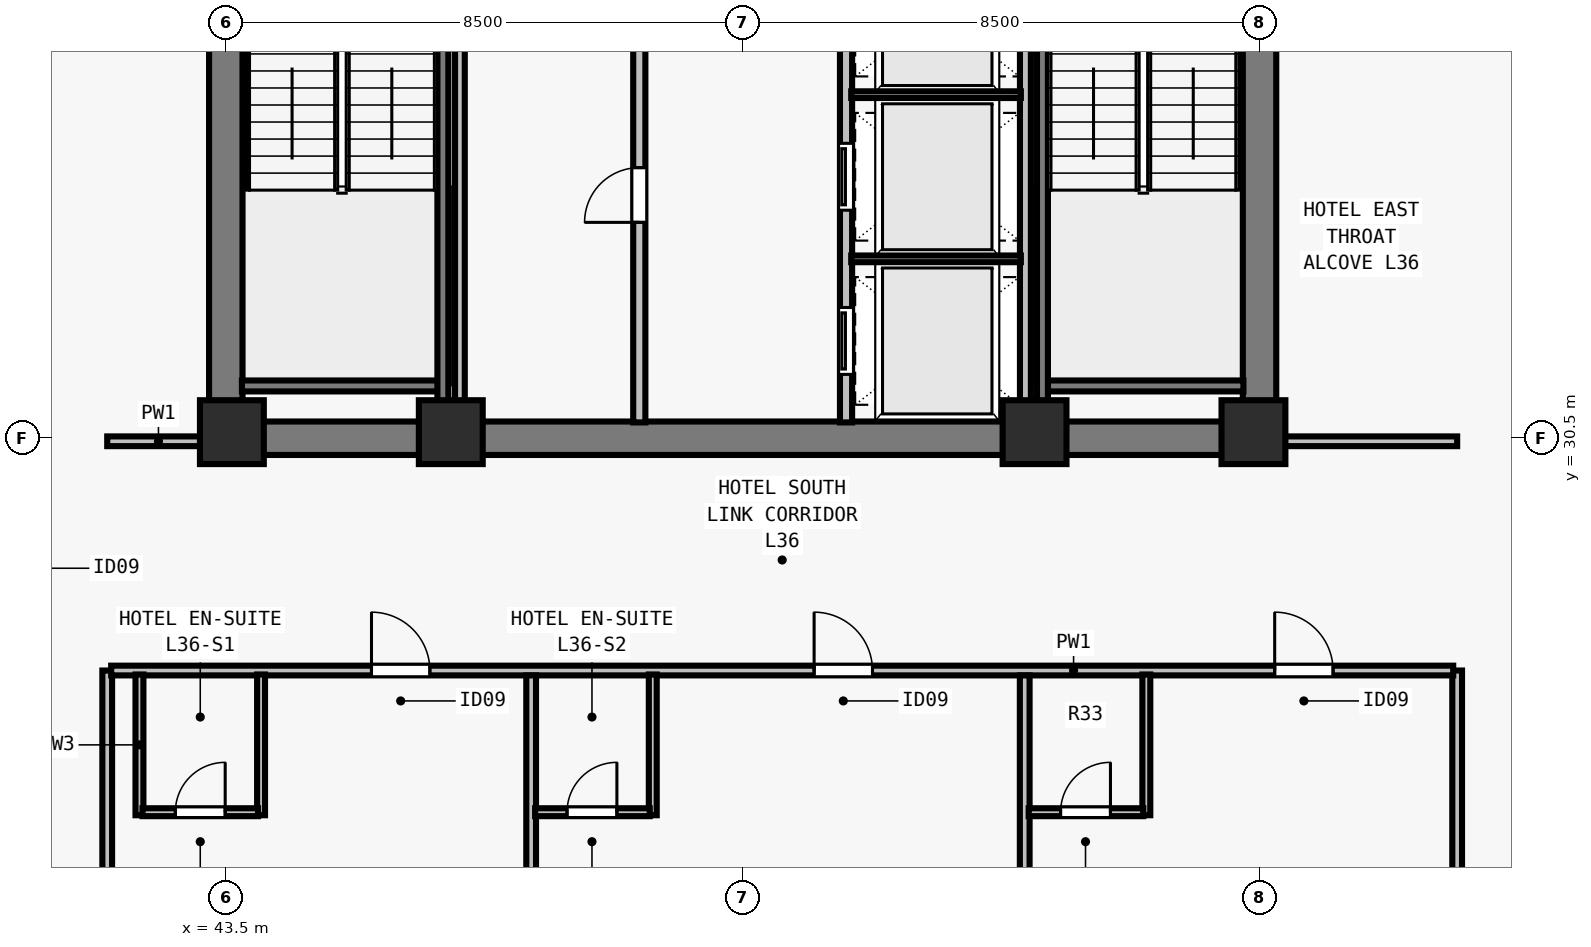
"""IFC4 building model, lengths in metres.
Left out: names, types, materials, properties, quantities, classifications, styles, units other than length and angle.
Written with IfcOpenShell. Run it as: python <this file> out.ifc"""

import sys

from ifc_helpers import new_model, si_unit, direction, frame, frame_2d, origin, origin_2d, place, context, subcontext, project, spatial, rectangle, extrude, element, fill, save


model = new_model("IFC4")
c1 = context("Model", 3, precision=1e-05, world=origin(), true_north=direction((0.0, 1.0)))
c2 = subcontext(c1, "Body", "Model", "MODEL_VIEW")
j1 = project(units=[si_unit("LENGTHUNIT", "METRE"), si_unit("PLANEANGLEUNIT", "RADIAN")], contexts=[c1])
p1 = place(None, origin())
s1 = spatial("IfcSite", under=j1, at=p1, CompositionType="ELEMENT")
p2 = place(p1, origin())
s2 = spatial("IfcBuilding", under=s1, at=p2, CompositionType="ELEMENT")
p3 = place(p2, frame((0.0, 0.0, 134.0)))
s3 = spatial("IfcBuildingStorey", under=s2, at=p3, CompositionType="ELEMENT", Elevation=134.0)
for number, where, z_axis, x_axis in (
    (1, (43.6, 30.6, 0.0), (0.0, 0.0, 1.0), (1.0, 0.0, 0.0)),
    (2, (47.2, 30.6, 0.0), (0.0, 0.0, 1.0), (1.0, 0.0, 0.0)),
    (3, (56.8, 30.6, 0.0), (0.0, 0.0, 1.0), (1.0, 0.0, 0.0)),
    (4, (60.4, 30.6, 0.0), (0.0, 0.0, 1.0), (1.0, 0.0, 0.0)),
):
    element("IfcColumn", number, at=place(p3, frame(where, z_axis=z_axis, x_axis=x_axis)), inside=s3, PredefinedType="COLUMN", context=c2, shape_type="SweptSolid", body=[
        extrude(rectangle(XDim=1.05, YDim=1.05, at=origin_2d()), origin(), (0.0, 0.0, 1.0), 3.5),
    ])
p4 = place(p3, frame((43.225, 30.5, 0.0), z_axis=(0.0, 0.0, 1.0), x_axis=(1.0, 0.0, 0.0)))
e5 = element("IfcWall", 5, at=p4, inside=s3, PredefinedType="SHEAR", context=c2, shape_type="SweptSolid", body=[
    extrude(rectangle(XDim=17.55, YDim=0.55, at=frame_2d((8.775, 0.0))), origin(), (0.0, 0.0, 1.0), 3.28),
])
for number, where, z_axis, x_axis in (
    (6, (43.5, 30.765, 0.0), (0.0, 0.0, 1.0), (0.0, 1.0, 0.0)),
    (7, (60.5, 30.765, 0.0), (0.0, 0.0, 1.0), (0.0, 1.0, 0.0)),
):
    element("IfcWall", number, at=place(p3, frame(where, z_axis=z_axis, x_axis=x_axis)), inside=s3, PredefinedType="SHEAR", context=c2, shape_type="SweptSolid", body=[
        extrude(rectangle(XDim=7.985, YDim=0.55, at=frame_2d((3.993, 0.0))), origin(), (0.0, 0.0, 1.0), 3.28),
    ])
p5 = place(p3, frame((50.3, 30.76, 0.0), z_axis=(0.0, 0.0, 1.0), x_axis=(0.0, 1.0, 0.0)))
e8 = element("IfcWall", 8, at=p5, inside=s3, PredefinedType="SOLIDWALL", context=c2, shape_type="SweptSolid", body=[
    extrude(rectangle(XDim=7.855, YDim=0.2, at=frame_2d((3.927, 0.0))), origin(), (0.0, 0.0, 1.0), 3.28),
])
p6 = place(p5, frame((3.29, 0.0, 0.0)))
e9 = element("IfcOpeningElement", 9, at=p6, cuts=e8, PredefinedType="OPENING", context=c2, shape_type="SweptSolid", body=[
    extrude(rectangle(XDim=0.9, YDim=2.12, at=frame_2d((0.45, 1.06))), frame((0.0, 0.11, 0.0), z_axis=(0.0, -1.0, 0.0), x_axis=(1.0, 0.0, 0.0)), (0.0, 0.0, 1.0), 0.22),
])
p7 = place(p3, frame((53.7, 30.76, 0.0), z_axis=(0.0, 0.0, 1.0), x_axis=(0.0, 1.0, 0.0)))
e10 = element("IfcWall", 10, at=p7, inside=s3, PredefinedType="SOLIDWALL", context=c2, shape_type="SweptSolid", body=[
    extrude(rectangle(XDim=7.855, YDim=0.2, at=frame_2d((3.927, 0.0))), origin(), (0.0, 0.0, 1.0), 3.28),
])
p8 = place(p7, frame((0.79, 0.0, 0.0)))
e11 = element("IfcOpeningElement", 11, at=p8, cuts=e10, PredefinedType="OPENING", context=c2, shape_type="SweptSolid", body=[
    extrude(rectangle(XDim=1.1, YDim=2.2, at=frame_2d((0.55, 1.1))), frame((0.0, 0.11, 0.0), z_axis=(0.0, -1.0, 0.0), x_axis=(1.0, 0.0, 0.0)), (0.0, 0.0, 1.0), 0.22),
])
p9 = place(p7, frame((3.49, 0.0, 0.0)))
e12 = element("IfcOpeningElement", 12, at=p9, cuts=e10, PredefinedType="OPENING", context=c2, shape_type="SweptSolid", body=[
    extrude(rectangle(XDim=1.1, YDim=2.2, at=frame_2d((0.55, 1.1))), frame((0.0, 0.11, 0.0), z_axis=(0.0, -1.0, 0.0), x_axis=(1.0, 0.0, 0.0)), (0.0, 0.0, 1.0), 0.22),
])
p10 = place(p7, frame((6.19, 0.0, 0.0)))
e13 = element("IfcOpeningElement", 13, at=p10, cuts=e10, PredefinedType="OPENING", context=c2, shape_type="SweptSolid", body=[
    extrude(rectangle(XDim=1.1, YDim=2.2, at=frame_2d((0.55, 1.1))), frame((0.0, 0.11, 0.0), z_axis=(0.0, -1.0, 0.0), x_axis=(1.0, 0.0, 0.0)), (0.0, 0.0, 1.0), 0.22),
])
p11 = place(p3, frame((47.35, 30.76, 0.0), z_axis=(0.0, 0.0, 1.0), x_axis=(0.0, 1.0, 0.0)))
e14 = element("IfcWall", 14, at=p11, inside=s3, PredefinedType="PARTITIONING", context=c2, shape_type="SweptSolid", body=[
    extrude(rectangle(XDim=7.855, YDim=0.16, at=frame_2d((3.927, 0.0))), origin(), (0.0, 0.0, 1.0), 3.28),
])
p12 = place(p3, frame((56.65, 30.76, 0.0), z_axis=(0.0, 0.0, 1.0), x_axis=(0.0, 1.0, 0.0)))
e15 = element("IfcWall", 15, at=p12, inside=s3, PredefinedType="SOLIDWALL", context=c2, shape_type="SweptSolid", body=[
    extrude(rectangle(XDim=7.855, YDim=0.18, at=frame_2d((3.927, 0.0))), origin(), (0.0, 0.0, 1.0), 3.28),
])
for number, where, z_axis, x_axis in (
    (16, (53.785, 33.45, 0.0), (0.0, 0.0, 1.0), (1.0, 0.0, 0.0)),
    (17, (53.785, 36.15, 0.0), (0.0, 0.0, 1.0), (1.0, 0.0, 0.0)),
):
    element("IfcWall", number, at=place(p3, frame(where, z_axis=z_axis, x_axis=x_axis)), inside=s3, PredefinedType="PARTITIONING", context=c2, shape_type="SweptSolid", body=[
        extrude(rectangle(XDim=2.79, YDim=0.11, at=frame_2d((1.395, 0.0))), origin(), (0.0, 0.0, 1.0), 3.28),
    ])
p13 = place(p3, frame((41.55, 15.325, 0.0), z_axis=(0.0, 0.0, 1.0), x_axis=(0.0, 1.0, 0.0)))
e18 = element("IfcWall", 18, at=p13, inside=s3, PredefinedType="PARTITIONING", context=c2, shape_type="SweptSolid", body=[
    extrude(rectangle(XDim=11.355, YDim=0.16, at=frame_2d((5.677, 0.0))), origin(), (0.0, 0.0, 1.0), 3.28),
])
p14 = place(p3, frame((41.55, 30.45, 0.0), z_axis=(0.0, 0.0, 1.0), x_axis=(1.0, 0.0, 0.0)))
e19 = element("IfcWall", 19, at=p14, inside=s3, PredefinedType="PARTITIONING", context=c2, shape_type="SweptSolid", body=[
    extrude(rectangle(XDim=1.685, YDim=0.16, at=frame_2d((0.843, 0.0))), origin(), (0.0, 0.0, 1.0), 3.28),
])
p15 = place(p3, frame((63.75, 15.325, 0.0), z_axis=(0.0, 0.0, 1.0), x_axis=(0.0, 1.0, 0.0)))
e20 = element("IfcWall", 20, at=p15, inside=s3, PredefinedType="PARTITIONING", context=c2, shape_type="SweptSolid", body=[
    extrude(rectangle(XDim=11.355, YDim=0.16, at=frame_2d((5.677, 0.0))), origin(), (0.0, 0.0, 1.0), 2.555),
])
p16 = place(p3, frame((60.765, 30.45, 0.0), z_axis=(0.0, 0.0, 1.0), x_axis=(1.0, 0.0, 0.0)))
e21 = element("IfcWall", 21, at=p16, inside=s3, PredefinedType="PARTITIONING", context=c2, shape_type="SweptSolid", body=[
    extrude(rectangle(XDim=2.985, YDim=0.16, at=frame_2d((1.493, 0.0))), origin(), (0.0, 0.0, 1.0), 3.28),
])
p17 = place(p3, frame((41.615, 26.68, 0.0), z_axis=(0.0, 0.0, 1.0), x_axis=(1.0, 0.0, 0.0)))
e22 = element("IfcWall", 22, at=p17, inside=s3, PredefinedType="PARTITIONING", context=c2, shape_type="SweptSolid", body=[
    extrude(rectangle(XDim=22.07, YDim=0.16, at=frame_2d((11.035, 0.0))), origin(), (0.0, 0.0, 1.0), 3.28),
])
p18 = place(p17, frame((4.281, 0.0, 0.0)))
e23 = element("IfcOpeningElement", 23, at=p18, cuts=e22, PredefinedType="OPENING", context=c2, shape_type="SweptSolid", body=[
    extrude(rectangle(XDim=0.96, YDim=2.15, at=frame_2d((0.48, 1.075))), frame((0.0, 0.09, 0.0), z_axis=(0.0, -1.0, 0.0), x_axis=(1.0, 0.0, 0.0)), (0.0, 0.0, 1.0), 0.18),
])
p19 = place(p17, frame((11.56, 0.0, 0.0)))
e24 = element("IfcOpeningElement", 24, at=p19, cuts=e22, PredefinedType="OPENING", context=c2, shape_type="SweptSolid", body=[
    extrude(rectangle(XDim=0.96, YDim=2.15, at=frame_2d((0.48, 1.075))), frame((0.0, 0.09, 0.0), z_axis=(0.0, -1.0, 0.0), x_axis=(1.0, 0.0, 0.0)), (0.0, 0.0, 1.0), 0.18),
])
p20 = place(p17, frame((19.134, 0.0, 0.0)))
e25 = element("IfcOpeningElement", 25, at=p20, cuts=e22, PredefinedType="OPENING", context=c2, shape_type="SweptSolid", body=[
    extrude(rectangle(XDim=0.96, YDim=2.15, at=frame_2d((0.48, 1.075))), frame((0.0, 0.09, 0.0), z_axis=(0.0, -1.0, 0.0), x_axis=(1.0, 0.0, 0.0)), (0.0, 0.0, 1.0), 0.18),
])
for number, where, z_axis, x_axis in (
    (26, (42.08, 24.3, 0.0), (0.0, 0.0, 1.0), (0.0, 1.0, 0.0)),
    (27, (44.08, 24.3, 0.0), (0.0, 0.0, 1.0), (0.0, 1.0, 0.0)),
):
    element("IfcWall", number, at=place(p3, frame(where, z_axis=z_axis, x_axis=x_axis)), inside=s3, PredefinedType="PLUMBINGWALL", context=c2, shape_type="SweptSolid", body=[
        extrude(rectangle(XDim=2.315, YDim=0.13, at=frame_2d((1.157, 0.0))), origin(), (0.0, 0.0, 1.0), 3.28),
    ])
p21 = place(p3, frame((42.13, 24.35, 0.0), z_axis=(0.0, 0.0, 1.0), x_axis=(1.0, 0.0, 0.0)))
e28 = element("IfcWall", 28, at=p21, inside=s3, PredefinedType="PLUMBINGWALL", context=c2, shape_type="SweptSolid", body=[
    extrude(rectangle(XDim=1.9, YDim=0.13, at=frame_2d((0.95, 0.0))), origin(), (0.0, 0.0, 1.0), 3.28),
])
p22 = place(p21, frame((0.54, 0.0, 0.0)))
e29 = element("IfcOpeningElement", 29, at=p22, cuts=e28, PredefinedType="OPENING", context=c2, shape_type="SweptSolid", body=[
    extrude(rectangle(XDim=0.82, YDim=2.1, at=frame_2d((0.41, 1.05))), frame((0.0, 0.075, 0.0), z_axis=(0.0, -1.0, 0.0), x_axis=(1.0, 0.0, 0.0)), (0.0, 0.0, 1.0), 0.15),
])
p23 = place(p3, frame((48.522, 15.325, 0.0), z_axis=(0.0, 0.0, 1.0), x_axis=(0.0, 1.0, 0.0)))
e30 = element("IfcWall", 30, at=p23, inside=s3, PredefinedType="PARTITIONING", context=c2, shape_type="SweptSolid", body=[
    extrude(rectangle(XDim=11.275, YDim=0.16, at=frame_2d((5.638, 0.0))), origin(), (0.0, 0.0, 1.0), 2.896),
])
p24 = place(p3, frame((50.522, 24.3, 0.0), z_axis=(0.0, 0.0, 1.0), x_axis=(0.0, 1.0, 0.0)))
e31 = element("IfcWall", 31, at=p24, inside=s3, PredefinedType="PLUMBINGWALL", context=c2, shape_type="SweptSolid", body=[
    extrude(rectangle(XDim=2.315, YDim=0.13, at=frame_2d((1.157, 0.0))), origin(), (0.0, 0.0, 1.0), 3.28),
])
p25 = place(p3, frame((48.587, 24.35, 0.0), z_axis=(0.0, 0.0, 1.0), x_axis=(1.0, 0.0, 0.0)))
e32 = element("IfcWall", 32, at=p25, inside=s3, PredefinedType="PLUMBINGWALL", context=c2, shape_type="SweptSolid", body=[
    extrude(rectangle(XDim=1.885, YDim=0.13, at=frame_2d((0.942, 0.0))), origin(), (0.0, 0.0, 1.0), 3.28),
])
p26 = place(p25, frame((0.525, 0.0, 0.0)))
e33 = element("IfcOpeningElement", 33, at=p26, cuts=e32, PredefinedType="OPENING", context=c2, shape_type="SweptSolid", body=[
    extrude(rectangle(XDim=0.82, YDim=2.1, at=frame_2d((0.41, 1.05))), frame((0.0, 0.075, 0.0), z_axis=(0.0, -1.0, 0.0), x_axis=(1.0, 0.0, 0.0)), (0.0, 0.0, 1.0), 0.15),
])
p27 = place(p3, frame((56.638, 15.325, 0.0), z_axis=(0.0, 0.0, 1.0), x_axis=(0.0, 1.0, 0.0)))
e34 = element("IfcWall", 34, at=p27, inside=s3, PredefinedType="PARTITIONING", context=c2, shape_type="SweptSolid", body=[
    extrude(rectangle(XDim=11.275, YDim=0.16, at=frame_2d((5.638, 0.0))), origin(), (0.0, 0.0, 1.0), 2.555),
])
p28 = place(p3, frame((58.638, 24.3, 0.0), z_axis=(0.0, 0.0, 1.0), x_axis=(0.0, 1.0, 0.0)))
e35 = element("IfcWall", 35, at=p28, inside=s3, PredefinedType="PLUMBINGWALL", context=c2, shape_type="SweptSolid", body=[
    extrude(rectangle(XDim=2.315, YDim=0.13, at=frame_2d((1.157, 0.0))), origin(), (0.0, 0.0, 1.0), 3.28),
])
p29 = place(p3, frame((56.703, 24.35, 0.0), z_axis=(0.0, 0.0, 1.0), x_axis=(1.0, 0.0, 0.0)))
e36 = element("IfcWall", 36, at=p29, inside=s3, PredefinedType="PLUMBINGWALL", context=c2, shape_type="SweptSolid", body=[
    extrude(rectangle(XDim=1.885, YDim=0.13, at=frame_2d((0.942, 0.0))), origin(), (0.0, 0.0, 1.0), 3.28),
])
p30 = place(p29, frame((0.525, 0.0, 0.0)))
e37 = element("IfcOpeningElement", 37, at=p30, cuts=e36, PredefinedType="OPENING", context=c2, shape_type="SweptSolid", body=[
    extrude(rectangle(XDim=0.82, YDim=2.1, at=frame_2d((0.41, 1.05))), frame((0.0, 0.075, 0.0), z_axis=(0.0, -1.0, 0.0), x_axis=(1.0, 0.0, 0.0)), (0.0, 0.0, 1.0), 0.15),
])
p31 = place(p3, frame((43.765, 31.36, 0.0), z_axis=(0.0, 0.0, 1.0), x_axis=(1.0, 0.0, 0.0)))
e38 = element("IfcWall", 38, at=p31, inside=s3, PredefinedType="SOLIDWALL", context=c2, shape_type="SweptSolid", body=[
    extrude(rectangle(XDim=3.23, YDim=0.18, at=frame_2d((1.615, 0.0))), origin(), (0.0, 0.0, 1.0), 3.28),
])
p32 = place(p3, frame((47.07, 38.78, 0.0), z_axis=(0.0, 0.0, 1.0), x_axis=(0.0, -1.0, 0.0)))
e39 = element("IfcWall", 39, at=p32, inside=s3, PredefinedType="SOLIDWALL", context=c2, shape_type="SweptSolid", body=[
    extrude(rectangle(XDim=8.017, YDim=0.18, at=frame_2d((4.009, 0.0))), origin(), (0.0, 0.0, 1.0), 3.28),
])
p33 = place(p3, frame((57.005, 31.36, 0.0), z_axis=(0.0, 0.0, 1.0), x_axis=(1.0, 0.0, 0.0)))
e40 = element("IfcWall", 40, at=p33, inside=s3, PredefinedType="SOLIDWALL", context=c2, shape_type="SweptSolid", body=[
    extrude(rectangle(XDim=3.23, YDim=0.18, at=frame_2d((1.615, 0.0))), origin(), (0.0, 0.0, 1.0), 3.28),
])
p34 = place(p3, frame((56.93, 38.78, 0.0), z_axis=(0.0, 0.0, 1.0), x_axis=(0.0, -1.0, 0.0)))
e41 = element("IfcWall", 41, at=p34, inside=s3, PredefinedType="SOLIDWALL", context=c2, shape_type="SweptSolid", body=[
    extrude(rectangle(XDim=8.017, YDim=0.18, at=frame_2d((4.009, 0.0))), origin(), (0.0, 0.0, 1.0), 3.28),
])
p35 = place(p6, origin())
e42 = element("IfcDoor", 42, at=p35, inside=s3, OperationType="SINGLE_SWING_LEFT", PredefinedType="DOOR", context=c2, shape_type="SweptSolid", body=[
    extrude(rectangle(XDim=0.9, YDim=2.12, at=frame_2d((0.45, 1.06))), frame((0.0, 0.025, 0.0), z_axis=(0.0, -1.0, 0.0), x_axis=(1.0, 0.0, 0.0)), (0.0, 0.0, 1.0), 0.05),
])
fill(e9, e42)
p36 = place(p8, origin())
e43 = element("IfcDoor", 43, at=p36, inside=s3, OperationType="SLIDING_TO_LEFT", PredefinedType="DOOR", context=c2, shape_type="SweptSolid", body=[
    extrude(rectangle(XDim=1.1, YDim=2.2, at=frame_2d((0.55, 1.1))), frame((0.0, 0.025, 0.0), z_axis=(0.0, -1.0, 0.0), x_axis=(1.0, 0.0, 0.0)), (0.0, 0.0, 1.0), 0.05),
])
fill(e11, e43)
p37 = place(p9, origin())
e44 = element("IfcDoor", 44, at=p37, inside=s3, OperationType="SLIDING_TO_LEFT", PredefinedType="DOOR", context=c2, shape_type="SweptSolid", body=[
    extrude(rectangle(XDim=1.1, YDim=2.2, at=frame_2d((0.55, 1.1))), frame((0.0, 0.025, 0.0), z_axis=(0.0, -1.0, 0.0), x_axis=(1.0, 0.0, 0.0)), (0.0, 0.0, 1.0), 0.05),
])
fill(e12, e44)
p38 = place(p22, origin())
e45 = element("IfcDoor", 45, at=p38, inside=s3, OperationType="SINGLE_SWING_RIGHT", PredefinedType="DOOR", context=c2, shape_type="SweptSolid", body=[
    extrude(rectangle(XDim=0.82, YDim=2.1, at=frame_2d((0.41, 1.05))), frame((0.0, 0.025, 0.0), z_axis=(0.0, -1.0, 0.0), x_axis=(1.0, 0.0, 0.0)), (0.0, 0.0, 1.0), 0.05),
])
fill(e29, e45)
p39 = place(p18, origin())
e46 = element("IfcDoor", 46, at=p39, inside=s3, OperationType="SINGLE_SWING_LEFT", PredefinedType="DOOR", context=c2, shape_type="SweptSolid", body=[
    extrude(rectangle(XDim=0.96, YDim=2.15, at=frame_2d((0.48, 1.075))), frame((0.0, 0.025, 0.0), z_axis=(0.0, -1.0, 0.0), x_axis=(1.0, 0.0, 0.0)), (0.0, 0.0, 1.0), 0.05),
])
fill(e23, e46)
p40 = place(p26, origin())
e47 = element("IfcDoor", 47, at=p40, inside=s3, OperationType="SINGLE_SWING_RIGHT", PredefinedType="DOOR", context=c2, shape_type="SweptSolid", body=[
    extrude(rectangle(XDim=0.82, YDim=2.1, at=frame_2d((0.41, 1.05))), frame((0.0, 0.025, 0.0), z_axis=(0.0, -1.0, 0.0), x_axis=(1.0, 0.0, 0.0)), (0.0, 0.0, 1.0), 0.05),
])
fill(e33, e47)
p41 = place(p19, origin())
e48 = element("IfcDoor", 48, at=p41, inside=s3, OperationType="SINGLE_SWING_LEFT", PredefinedType="DOOR", context=c2, shape_type="SweptSolid", body=[
    extrude(rectangle(XDim=0.96, YDim=2.15, at=frame_2d((0.48, 1.075))), frame((0.0, 0.025, 0.0), z_axis=(0.0, -1.0, 0.0), x_axis=(1.0, 0.0, 0.0)), (0.0, 0.0, 1.0), 0.05),
])
fill(e24, e48)
p42 = place(p30, origin())
e49 = element("IfcDoor", 49, at=p42, inside=s3, OperationType="SINGLE_SWING_RIGHT", PredefinedType="DOOR", context=c2, shape_type="SweptSolid", body=[
    extrude(rectangle(XDim=0.82, YDim=2.1, at=frame_2d((0.41, 1.05))), frame((0.0, 0.025, 0.0), z_axis=(0.0, -1.0, 0.0), x_axis=(1.0, 0.0, 0.0)), (0.0, 0.0, 1.0), 0.05),
])
fill(e37, e49)
p43 = place(p20, origin())
e50 = element("IfcDoor", 50, at=p43, inside=s3, OperationType="SINGLE_SWING_LEFT", PredefinedType="DOOR", context=c2, shape_type="SweptSolid", body=[
    extrude(rectangle(XDim=0.96, YDim=2.15, at=frame_2d((0.48, 1.075))), frame((0.0, 0.025, 0.0), z_axis=(0.0, -1.0, 0.0), x_axis=(1.0, 0.0, 0.0)), (0.0, 0.0, 1.0), 0.05),
])
fill(e25, e50)
save(model, sys.argv[1])
